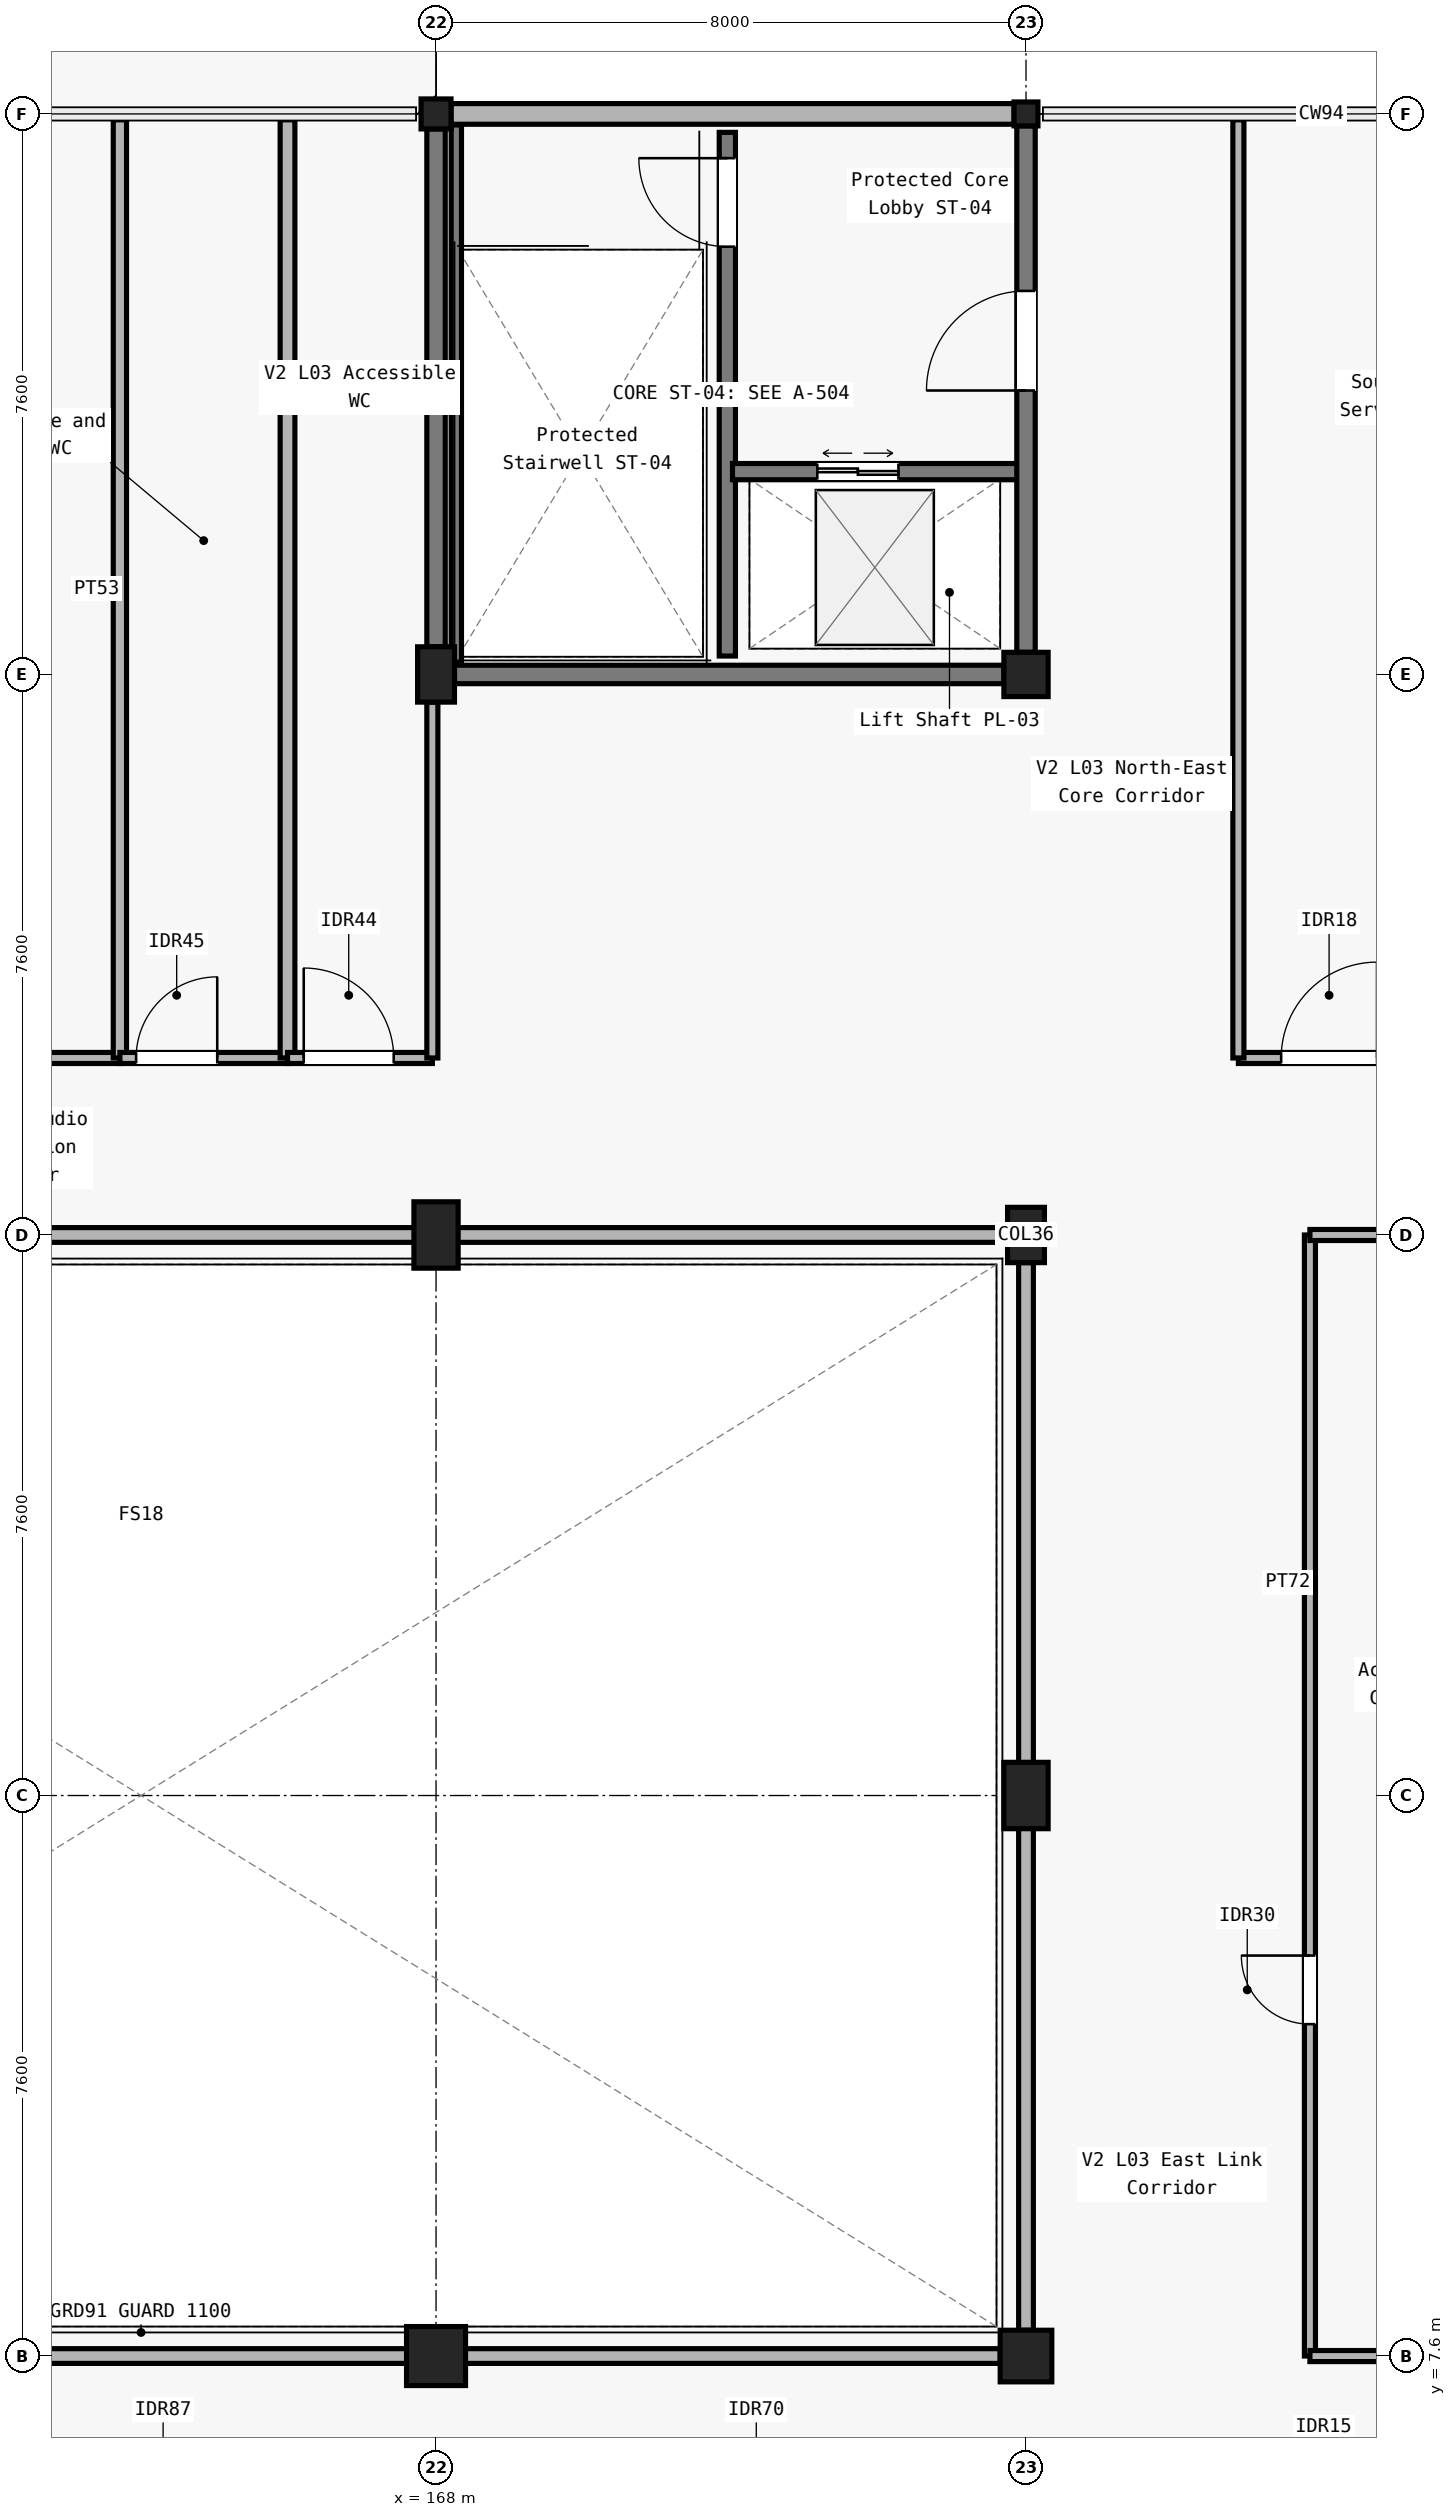
"""IFC4 building model, lengths in metres.
Left out: names, types, materials, properties, quantities, classifications, styles, units other than length and angle.
Written with IfcOpenShell. Run it as: python <this file> out.ifc"""

import sys

from ifc_helpers import new_model, si_unit, direction, frame, frame_2d, origin, origin_2d, place, context, subcontext, project, spatial, rectangle, hollow_circle, extrude, element, fill, save


model = new_model("IFC4")
c1 = context("Model", 3, precision=1e-05, world=origin(), true_north=direction((0.0, 1.0)))
c2 = subcontext(c1, "Body", "Model", "MODEL_VIEW")
j1 = project(units=[si_unit("LENGTHUNIT", "METRE"), si_unit("PLANEANGLEUNIT", "RADIAN")], contexts=[c1])
p1 = place(None, origin())
s1 = spatial("IfcSite", under=j1, at=p1, CompositionType="ELEMENT")
p2 = place(p1, origin())
s2 = spatial("IfcBuilding", under=s1, at=p2, CompositionType="ELEMENT")
p3 = place(p2, frame((0.0, 0.0, 15.0)))
s3 = spatial("IfcBuildingStorey", under=s2, at=p3, CompositionType="ELEMENT", Elevation=15.0)
p4 = place(p3, frame((168.0, 7.6, 0.0), z_axis=(0.0, 0.0, 1.0), x_axis=(1.0, 0.0, 0.0)))
e1 = element("IfcColumn", 1, at=p4, inside=s3, PredefinedType="COLUMN", context=c2, shape_type="SweptSolid", body=[
    extrude(rectangle(XDim=0.8, YDim=0.8, at=origin_2d()), origin(), (0.0, 0.0, 1.0), 4.53),
])
p5 = place(p3, frame((168.0, 22.8, 0.0), z_axis=(0.0, 0.0, 1.0), x_axis=(1.0, 0.0, 0.0)))
e2 = element("IfcColumn", 2, at=p5, inside=s3, PredefinedType="COLUMN", context=c2, shape_type="SweptSolid", body=[
    extrude(rectangle(XDim=0.6, YDim=0.9, at=origin_2d()), origin(), (0.0, 0.0, 1.0), 4.53),
])
p6 = place(p3, frame((168.0, 30.4, 0.0), z_axis=(0.0, 0.0, 1.0), x_axis=(1.0, 0.0, 0.0)))
e3 = element("IfcColumn", 3, at=p6, inside=s3, PredefinedType="COLUMN", context=c2, shape_type="SweptSolid", body=[
    extrude(rectangle(XDim=0.5, YDim=0.75, at=origin_2d()), origin(), (0.0, 0.0, 1.0), 4.53),
])
p7 = place(p3, frame((168.0, 38.0, 0.0), z_axis=(0.0, 0.0, 1.0), x_axis=(1.0, 0.0, 0.0)))
e4 = element("IfcColumn", 4, at=p7, inside=s3, PredefinedType="COLUMN", context=c2, shape_type="SweptSolid", body=[
    extrude(hollow_circle(Radius=0.203, WallThickness=0.02, at=origin_2d()), origin(), (0.0, 0.0, 1.0), 4.53),
])
p8 = place(p3, frame((176.0, 7.6, 0.0), z_axis=(0.0, 0.0, 1.0), x_axis=(1.0, 0.0, 0.0)))
e5 = element("IfcColumn", 5, at=p8, inside=s3, PredefinedType="COLUMN", context=c2, shape_type="SweptSolid", body=[
    extrude(rectangle(XDim=0.7, YDim=0.7, at=origin_2d()), origin(), (0.0, 0.0, 1.0), 4.53),
])
p9 = place(p3, frame((176.0, 15.2, 0.0), z_axis=(0.0, 0.0, 1.0), x_axis=(1.0, 0.0, 0.0)))
e6 = element("IfcColumn", 6, at=p9, inside=s3, PredefinedType="COLUMN", context=c2, shape_type="SweptSolid", body=[
    extrude(rectangle(XDim=0.6, YDim=0.9, at=origin_2d()), origin(), (0.0, 0.0, 1.0), 4.53),
])
p10 = place(p3, frame((176.0, 22.8, 0.0), z_axis=(0.0, 0.0, 1.0), x_axis=(1.0, 0.0, 0.0)))
e7 = element("IfcColumn", 7, at=p10, inside=s3, PredefinedType="COLUMN", context=c2, shape_type="SweptSolid", body=[
    extrude(rectangle(XDim=0.5, YDim=0.75, at=origin_2d()), origin(), (0.0, 0.0, 1.0), 4.53),
])
p11 = place(p3, frame((176.0, 30.4, 0.0), z_axis=(0.0, 0.0, 1.0), x_axis=(1.0, 0.0, 0.0)))
e8 = element("IfcColumn", 8, at=p11, inside=s3, PredefinedType="COLUMN", context=c2, shape_type="SweptSolid", body=[
    extrude(rectangle(XDim=0.6, YDim=0.6, at=origin_2d()), origin(), (0.0, 0.0, 1.0), 4.53),
])
p12 = place(p3, frame((176.0, 38.0, 0.0), z_axis=(0.0, 0.0, 1.0), x_axis=(1.0, 0.0, 0.0)))
e9 = element("IfcColumn", 9, at=p12, inside=s3, PredefinedType="COLUMN", context=c2, shape_type="SweptSolid", body=[
    extrude(hollow_circle(Radius=0.162, WallThickness=0.016, at=origin_2d()), origin(), (0.0, 0.0, 1.0), 4.53),
])
p13 = place(p3, frame((168.203, 38.0, 0.0), z_axis=(0.0, 0.0, 1.0), x_axis=(1.0, 0.0, 0.0)))
e10 = element("IfcWall", 10, at=p13, inside=s3, PredefinedType="SOLIDWALL", context=c2, shape_type="SweptSolid", body=[
    extrude(rectangle(XDim=7.635, YDim=0.28, at=frame_2d((3.817, 0.0))), origin(), (0.0, 0.0, 1.0), 4.12),
])
p14 = place(p3, frame((168.0, 30.775, 0.0), z_axis=(0.0, 0.0, 1.0), x_axis=(0.0, 1.0, 0.0)))
e11 = element("IfcWall", 11, at=p14, inside=s3, PredefinedType="SOLIDWALL", context=c2, shape_type="SweptSolid", body=[
    extrude(rectangle(XDim=7.022, YDim=0.25, at=frame_2d((3.511, 0.0))), origin(), (0.0, 0.0, 1.0), 3.88),
])
p15 = place(p3, frame((168.25, 30.4, 0.0), z_axis=(0.0, 0.0, 1.0), x_axis=(1.0, 0.0, 0.0)))
e12 = element("IfcWall", 12, at=p15, inside=s3, PredefinedType="SOLIDWALL", context=c2, shape_type="SweptSolid", body=[
    extrude(rectangle(XDim=7.45, YDim=0.25, at=frame_2d((3.725, 0.0))), origin(), (0.0, 0.0, 1.0), 3.88),
])
p16 = place(p3, frame((171.95, 30.65, 0.0), z_axis=(0.0, 0.0, 1.0), x_axis=(0.0, 1.0, 0.0)))
e13 = element("IfcWall", 13, at=p16, inside=s3, PredefinedType="SOLIDWALL", context=c2, shape_type="SweptSolid", body=[
    extrude(rectangle(XDim=7.1, YDim=0.22, at=frame_2d((3.55, 0.0))), origin(), (0.0, 0.0, 1.0), 4.53),
])
p17 = place(p16, frame((5.55, 0.0, 0.0)))
e14 = element("IfcOpeningElement", 14, at=p17, cuts=e13, PredefinedType="OPENING", context=c2, shape_type="SweptSolid", body=[
    extrude(rectangle(XDim=1.2, YDim=2.15, at=frame_2d((0.6, 1.075))), frame((0.0, 0.12, 0.0), z_axis=(0.0, -1.0, 0.0), x_axis=(1.0, 0.0, 0.0)), (0.0, 0.0, 1.0), 0.24),
])
p18 = place(p3, frame((172.02, 33.15, 0.0), z_axis=(0.0, 0.0, 1.0), x_axis=(1.0, 0.0, 0.0)))
e15 = element("IfcWall", 15, at=p18, inside=s3, PredefinedType="SOLIDWALL", context=c2, shape_type="SweptSolid", body=[
    extrude(rectangle(XDim=3.93, YDim=0.22, at=frame_2d((1.965, 0.0))), origin(), (0.0, 0.0, 1.0), 3.88),
])
p19 = place(p18, frame((1.15, 0.0, 0.0)))
e16 = element("IfcOpeningElement", 16, at=p19, cuts=e15, PredefinedType="OPENING", context=c2, shape_type="SweptSolid", body=[
    extrude(rectangle(XDim=1.1, YDim=2.2, at=frame_2d((0.55, 1.1))), frame((0.0, 0.12, 0.0), z_axis=(0.0, -1.0, 0.0), x_axis=(1.0, 0.0, 0.0)), (0.0, 0.0, 1.0), 0.24),
])
p20 = place(p3, frame((176.0, 30.7, 0.0), z_axis=(0.0, 0.0, 1.0), x_axis=(0.0, 1.0, 0.0)))
e17 = element("IfcWall", 17, at=p20, inside=s3, PredefinedType="SOLIDWALL", context=c2, shape_type="SweptSolid", body=[
    extrude(rectangle(XDim=7.138, YDim=0.25, at=frame_2d((3.569, 0.0))), origin(), (0.0, 0.0, 1.0), 3.88),
])
p21 = place(p20, frame((3.55, 0.0, 0.0)))
e18 = element("IfcOpeningElement", 18, at=p21, cuts=e17, PredefinedType="OPENING", context=c2, shape_type="SweptSolid", body=[
    extrude(rectangle(XDim=1.35, YDim=2.2, at=frame_2d((0.675, 1.1))), frame((0.0, 0.135, 0.0), z_axis=(0.0, -1.0, 0.0), x_axis=(1.0, 0.0, 0.0)), (0.0, 0.0, 1.0), 0.27),
])
p22 = place(p3, frame((176.0, 7.95, 0.0), z_axis=(0.0, 0.0, 1.0), x_axis=(0.0, 1.0, 0.0)))
e19 = element("IfcWall", 19, at=p22, inside=s3, PredefinedType="PARTITIONING", context=c2, shape_type="SweptSolid", body=[
    extrude(rectangle(XDim=14.475, YDim=0.2, at=frame_2d((7.238, 0.0))), origin(), (0.0, 0.0, 1.0), 3.88),
])
p23 = place(p3, frame((152.4, 22.8, 0.0), z_axis=(0.0, 0.0, 1.0), x_axis=(1.0, 0.0, 0.0)))
e20 = element("IfcWall", 20, at=p23, inside=s3, PredefinedType="PARTITIONING", context=c2, shape_type="SweptSolid", body=[
    extrude(rectangle(XDim=23.35, YDim=0.2, at=frame_2d((11.675, 0.0))), origin(), (0.0, 0.0, 1.0), 3.73),
])
p24 = place(p3, frame((152.4, 7.6, 0.0), z_axis=(0.0, 0.0, 1.0), x_axis=(1.0, 0.0, 0.0)))
e21 = element("IfcWall", 21, at=p24, inside=s3, PredefinedType="PARTITIONING", context=c2, shape_type="SweptSolid", body=[
    extrude(rectangle(XDim=23.25, YDim=0.2, at=frame_2d((11.625, 0.0))), origin(), (0.0, 0.0, 1.0), 3.73),
])
p25 = place(p3, frame((179.85, 7.6, 0.0), z_axis=(0.0, 0.0, 1.0), x_axis=(0.0, 1.0, 0.0)))
e22 = element("IfcWall", 22, at=p25, inside=s3, PredefinedType="PARTITIONING", context=c2, shape_type="SweptSolid", body=[
    extrude(rectangle(XDim=15.2, YDim=0.15, at=frame_2d((7.6, 0.0))), origin(), (0.0, 0.0, 1.0), 3.88),
])
p26 = place(p25, frame((4.5, 0.0, 0.0)))
e23 = element("IfcOpeningElement", 23, at=p26, cuts=e22, PredefinedType="OPENING", context=c2, shape_type="SweptSolid", body=[
    extrude(rectangle(XDim=0.93, YDim=2.1, at=frame_2d((0.465, 1.05))), frame((0.0, 0.085, 0.0), z_axis=(0.0, -1.0, 0.0), x_axis=(1.0, 0.0, 0.0)), (0.0, 0.0, 1.0), 0.17),
])
p27 = place(p3, frame((179.85, 7.6, 0.0), z_axis=(0.0, 0.0, 1.0), x_axis=(1.0, 0.0, 0.0)))
e24 = element("IfcWall", 24, at=p27, inside=s3, PredefinedType="PARTITIONING", context=c2, shape_type="SweptSolid", body=[
    extrude(rectangle(XDim=4.0, YDim=0.15, at=frame_2d((2.0, 0.0))), origin(), (0.0, 0.0, 1.0), 3.88),
])
p28 = place(p3, frame((179.85, 22.8, 0.0), z_axis=(0.0, 0.0, 1.0), x_axis=(1.0, 0.0, 0.0)))
e25 = element("IfcWall", 25, at=p28, inside=s3, PredefinedType="PARTITIONING", context=c2, shape_type="SweptSolid", body=[
    extrude(rectangle(XDim=3.947, YDim=0.15, at=frame_2d((1.973, 0.0))), origin(), (0.0, 0.0, 1.0), 3.88),
])
p29 = place(p3, frame((155.033, 25.2, 0.0), z_axis=(0.0, 0.0, 1.0), x_axis=(1.0, 0.0, 0.0)))
e26 = element("IfcWall", 26, at=p29, inside=s3, PredefinedType="PARTITIONING", context=c2, shape_type="SweptSolid", body=[
    extrude(rectangle(XDim=8.68, YDim=0.15, at=frame_2d((4.34, 0.0))), origin(), (0.0, 0.0, 1.0), 3.88),
])
p30 = place(p29, frame((0.22, 0.0, 0.0)))
e27 = element("IfcOpeningElement", 27, at=p30, cuts=e26, PredefinedType="OPENING", context=c2, shape_type="SweptSolid", body=[
    extrude(rectangle(XDim=1.04, YDim=2.15, at=frame_2d((0.52, 1.075))), frame((0.0, 0.085, 0.0), z_axis=(0.0, -1.0, 0.0), x_axis=(1.0, 0.0, 0.0)), (0.0, 0.0, 1.0), 0.17),
])
p31 = place(p3, frame((163.713, 25.2, 0.0), z_axis=(0.0, 0.0, 1.0), x_axis=(0.0, 1.0, 0.0)))
e28 = element("IfcWall", 28, at=p31, inside=s3, PredefinedType="PARTITIONING", context=c2, shape_type="SweptSolid", body=[
    extrude(rectangle(XDim=12.72, YDim=0.18, at=frame_2d((6.36, 0.0))), origin(), (0.0, 0.0, 1.0), 3.88),
])
p32 = place(p3, frame((163.713, 25.2, 0.0), z_axis=(0.0, 0.0, 1.0), x_axis=(1.0, 0.0, 0.0)))
e29 = element("IfcWall", 29, at=p32, inside=s3, PredefinedType="PARTITIONING", context=c2, shape_type="SweptSolid", body=[
    extrude(rectangle(XDim=2.273, YDim=0.15, at=frame_2d((1.137, 0.0))), origin(), (0.0, 0.0, 1.0), 4.53),
])
p33 = place(p32, frame((0.22, 0.0, 0.0)))
e30 = element("IfcOpeningElement", 30, at=p33, cuts=e29, PredefinedType="OPENING", context=c2, shape_type="SweptSolid", body=[
    extrude(rectangle(XDim=1.1, YDim=2.15, at=frame_2d((0.55, 1.075))), frame((0.0, 0.085, 0.0), z_axis=(0.0, -1.0, 0.0), x_axis=(1.0, 0.0, 0.0)), (0.0, 0.0, 1.0), 0.17),
])
p34 = place(p3, frame((165.986, 25.2, 0.0), z_axis=(0.0, 0.0, 1.0), x_axis=(0.0, 1.0, 0.0)))
e31 = element("IfcWall", 31, at=p34, inside=s3, PredefinedType="PARTITIONING", context=c2, shape_type="SweptSolid", body=[
    extrude(rectangle(XDim=12.72, YDim=0.2, at=frame_2d((6.36, 0.0))), origin(), (0.0, 0.0, 1.0), 3.88),
])
p35 = place(p3, frame((165.986, 25.2, 0.0), z_axis=(0.0, 0.0, 1.0), x_axis=(1.0, 0.0, 0.0)))
e32 = element("IfcWall", 32, at=p35, inside=s3, PredefinedType="PARTITIONING", context=c2, shape_type="SweptSolid", body=[
    extrude(rectangle(XDim=1.964, YDim=0.15, at=frame_2d((0.982, 0.0))), origin(), (0.0, 0.0, 1.0), 3.88),
])
p36 = place(p35, frame((0.22, 0.0, 0.0)))
e33 = element("IfcOpeningElement", 33, at=p36, cuts=e32, PredefinedType="OPENING", context=c2, shape_type="SweptSolid", body=[
    extrude(rectangle(XDim=1.22, YDim=2.15, at=frame_2d((0.61, 1.075))), frame((0.0, 0.085, 0.0), z_axis=(0.0, -1.0, 0.0), x_axis=(1.0, 0.0, 0.0)), (0.0, 0.0, 1.0), 0.17),
])
p37 = place(p3, frame((167.95, 25.2, 0.0), z_axis=(0.0, 0.0, 1.0), x_axis=(0.0, 1.0, 0.0)))
e34 = element("IfcWall", 34, at=p37, inside=s3, PredefinedType="PARTITIONING", context=c2, shape_type="SweptSolid", body=[
    extrude(rectangle(XDim=4.825, YDim=0.15, at=frame_2d((2.413, 0.0))), origin(), (0.0, 0.0, 1.0), 3.88),
])
p38 = place(p3, frame((178.88, 25.2, 0.0), z_axis=(0.0, 0.0, 1.0), x_axis=(1.0, 0.0, 0.0)))
e35 = element("IfcWall", 35, at=p38, inside=s3, PredefinedType="PARTITIONING", context=c2, shape_type="SweptSolid", body=[
    extrude(rectangle(XDim=5.04, YDim=0.15, at=frame_2d((2.52, 0.0))), origin(), (0.0, 0.0, 1.0), 3.88),
])
p39 = place(p38, frame((0.58, 0.0, 0.0)))
e36 = element("IfcOpeningElement", 36, at=p39, cuts=e35, PredefinedType="OPENING", context=c2, shape_type="SweptSolid", body=[
    extrude(rectangle(XDim=1.3, YDim=2.2, at=frame_2d((0.65, 1.1))), frame((0.0, 0.085, 0.0), z_axis=(0.0, -1.0, 0.0), x_axis=(1.0, 0.0, 0.0)), (0.0, 0.0, 1.0), 0.17),
])
p40 = place(p3, frame((178.88, 25.2, 0.0), z_axis=(0.0, 0.0, 1.0), x_axis=(0.0, 1.0, 0.0)))
e37 = element("IfcWall", 37, at=p40, inside=s3, PredefinedType="PARTITIONING", context=c2, shape_type="SweptSolid", body=[
    extrude(rectangle(XDim=12.72, YDim=0.15, at=frame_2d((6.36, 0.0))), origin(), (0.0, 0.0, 1.0), 3.88),
])
p41 = place(p3, frame((168.275, 30.55, 0.0), z_axis=(0.0, 0.0, 1.0), x_axis=(0.0, 1.0, 0.0)))
e38 = element("IfcWall", 38, at=p41, inside=s3, PredefinedType="SOLIDWALL", context=c2, shape_type="SweptSolid", body=[
    extrude(rectangle(XDim=7.3, YDim=0.14, at=frame_2d((3.65, 0.0))), origin(), (0.0, 0.0, 1.0), 4.53),
])
p42 = place(p17, origin())
e39 = element("IfcDoor", 39, at=p42, inside=s3, OperationType="SINGLE_SWING_RIGHT", PredefinedType="DOOR", context=c2, shape_type="SweptSolid", body=[
    extrude(rectangle(XDim=1.2, YDim=2.15, at=frame_2d((0.6, 1.075))), frame((0.0, 0.025, 0.0), z_axis=(0.0, -1.0, 0.0), x_axis=(1.0, 0.0, 0.0)), (0.0, 0.0, 1.0), 0.05),
])
fill(e14, e39)
p43 = place(p19, origin())
e40 = element("IfcDoor", 40, at=p43, inside=s3, OperationType="DOUBLE_DOOR_SLIDING", PredefinedType="DOOR", context=c2, shape_type="SweptSolid", body=[
    extrude(rectangle(XDim=1.1, YDim=2.2, at=frame_2d((0.55, 1.1))), frame((0.0, 0.025, 0.0), z_axis=(0.0, -1.0, 0.0), x_axis=(1.0, 0.0, 0.0)), (0.0, 0.0, 1.0), 0.05),
])
fill(e16, e40)
p44 = place(p21, origin())
e41 = element("IfcDoor", 41, at=p44, inside=s3, OperationType="SINGLE_SWING_LEFT", PredefinedType="DOOR", context=c2, shape_type="SweptSolid", body=[
    extrude(rectangle(XDim=1.35, YDim=2.2, at=frame_2d((0.675, 1.1))), frame((0.0, 0.025, 0.0), z_axis=(0.0, -1.0, 0.0), x_axis=(1.0, 0.0, 0.0)), (0.0, 0.0, 1.0), 0.05),
])
fill(e18, e41)
p45 = place(p26, origin())
e42 = element("IfcDoor", 42, at=p45, inside=s3, OperationType="SINGLE_SWING_RIGHT", PredefinedType="DOOR", context=c2, shape_type="SweptSolid", body=[
    extrude(rectangle(XDim=0.93, YDim=2.1, at=frame_2d((0.465, 1.05))), frame((0.0, 0.025, 0.0), z_axis=(0.0, -1.0, 0.0), x_axis=(1.0, 0.0, 0.0)), (0.0, 0.0, 1.0), 0.05),
])
fill(e23, e42)
p46 = place(p33, origin())
e43 = element("IfcDoor", 43, at=p46, inside=s3, OperationType="SINGLE_SWING_RIGHT", PredefinedType="DOOR", context=c2, shape_type="SweptSolid", body=[
    extrude(rectangle(XDim=1.1, YDim=2.15, at=frame_2d((0.55, 1.075))), frame((0.0, 0.025, 0.0), z_axis=(0.0, -1.0, 0.0), x_axis=(1.0, 0.0, 0.0)), (0.0, 0.0, 1.0), 0.05),
])
fill(e30, e43)
p47 = place(p36, origin())
e44 = element("IfcDoor", 44, at=p47, inside=s3, OperationType="SINGLE_SWING_LEFT", PredefinedType="DOOR", context=c2, shape_type="SweptSolid", body=[
    extrude(rectangle(XDim=1.22, YDim=2.15, at=frame_2d((0.61, 1.075))), frame((0.0, 0.025, 0.0), z_axis=(0.0, -1.0, 0.0), x_axis=(1.0, 0.0, 0.0)), (0.0, 0.0, 1.0), 0.05),
])
fill(e33, e44)
p48 = place(p39, origin())
e45 = element("IfcDoor", 45, at=p48, inside=s3, OperationType="SINGLE_SWING_RIGHT", PredefinedType="DOOR", context=c2, shape_type="SweptSolid", body=[
    extrude(rectangle(XDim=1.3, YDim=2.2, at=frame_2d((0.65, 1.1))), frame((0.0, 0.025, 0.0), z_axis=(0.0, -1.0, 0.0), x_axis=(1.0, 0.0, 0.0)), (0.0, 0.0, 1.0), 0.05),
])
fill(e36, e45)
save(model, sys.argv[1])
